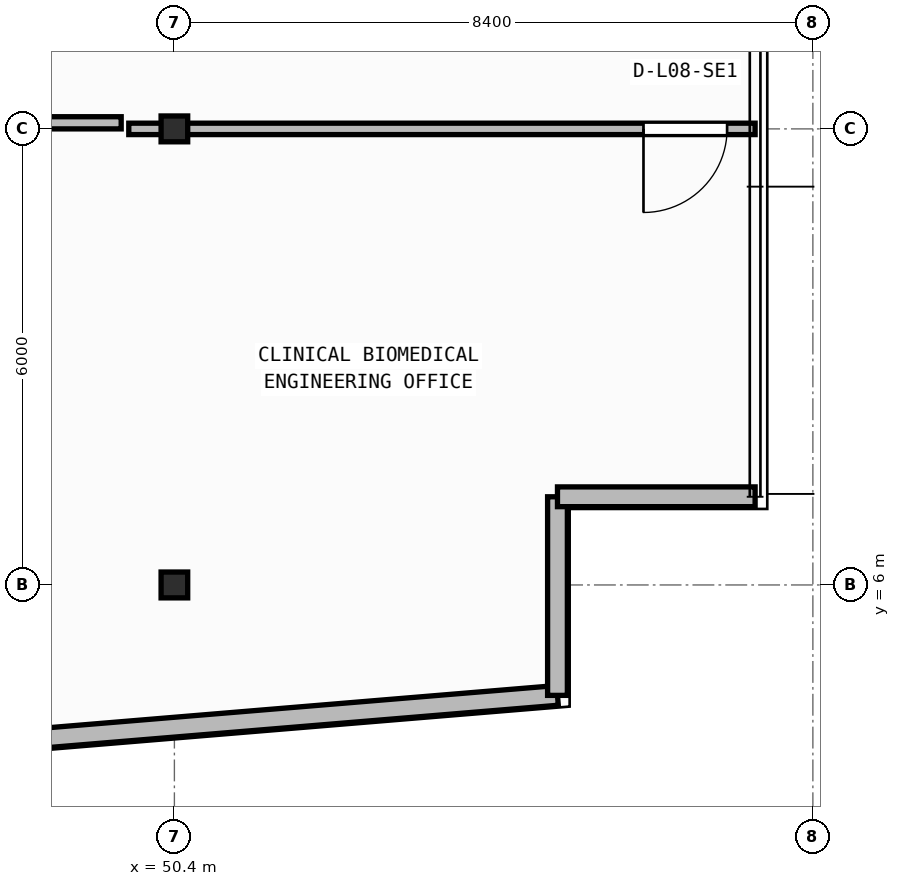
"""IFC4 building model, lengths in metres.
Left out: names, types, materials, properties, quantities, classifications, styles, units other than length and angle.
Written with IfcOpenShell. Run it as: python <this file> out.ifc"""

import sys

from ifc_helpers import new_model, si_unit, direction, frame, frame_2d, origin, origin_2d, place, context, subcontext, project, spatial, rectangle, i_section, extrude, element, fill, save


model = new_model("IFC4")
c1 = context("Model", 3, precision=1e-05, world=origin(), true_north=direction((0.0, 1.0)))
c2 = subcontext(c1, "Body", "Model", "MODEL_VIEW")
j1 = project(units=[si_unit("LENGTHUNIT", "METRE"), si_unit("PLANEANGLEUNIT", "RADIAN")], contexts=[c1])
p1 = place(None, origin())
s1 = spatial("IfcSite", under=j1, at=p1, CompositionType="ELEMENT")
p2 = place(p1, origin())
s2 = spatial("IfcBuilding", under=s1, at=p2, CompositionType="ELEMENT")
p3 = place(p2, frame((0.0, 0.0, 34.35)))
s3 = spatial("IfcBuildingStorey", under=s2, at=p3, CompositionType="ELEMENT", Elevation=34.35)
for number, where, z_axis, x_axis in (
    (1, (50.4, 6.0, 0.0), (0.0, 0.0, 1.0), (1.0, 0.0, 0.0)),
    (2, (50.4, 12.0, 0.0), (0.0, 0.0, 1.0), (1.0, 0.0, 0.0)),
):
    element("IfcColumn", number, at=place(p3, frame(where, z_axis=z_axis, x_axis=x_axis)), inside=s3, PredefinedType="COLUMN", context=c2, shape_type="SweptSolid", body=[
        extrude(i_section(OverallWidth=0.35, OverallDepth=0.34, WebThickness=0.016, FlangeThickness=0.028, at=origin_2d()), origin(), (0.0, 0.0, 1.0), 3.95),
    ])
p4 = place(p3, frame((2.76, 0.174, 0.0), z_axis=(0.0, 0.0, 1.0), x_axis=(0.996571478456, 0.082736257641, 0.0)))
e3 = element("IfcWall", 3, at=p4, inside=s3, PredefinedType="STANDARD", context=c2, shape_type="SweptSolid", body=[
    extrude(rectangle(XDim=52.861, YDim=0.26, at=frame_2d((26.431, 0.0))), origin(), (0.0, 0.0, 1.0), 3.71),
])
p5 = place(p4, frame((25.231, 0.0, 0.9)))
e4 = element("IfcOpeningElement", 4, at=p5, cuts=e3, PredefinedType="OPENING", context=c2, shape_type="SweptSolid", body=[
    extrude(rectangle(XDim=2.4, YDim=1.65, at=frame_2d((1.2, 0.825))), frame((0.0, 0.14, 0.0), z_axis=(0.0, -1.0, 0.0), x_axis=(1.0, 0.0, 0.0)), (0.0, 0.0, 1.0), 0.28),
])
p6 = place(p3, frame((55.44, 4.547, 0.0), z_axis=(0.0, 0.0, 1.0), x_axis=(0.0, 1.0, 0.0)))
e5 = element("IfcWall", 5, at=p6, inside=s3, PredefinedType="STANDARD", context=c2, shape_type="SweptSolid", body=[
    extrude(rectangle(XDim=2.613, YDim=0.26, at=frame_2d((1.306, 0.0))), origin(), (0.0, 0.0, 1.0), 3.71),
])
p7 = place(p3, frame((55.44, 7.16, 0.0), z_axis=(0.0, 0.0, 1.0), x_axis=(1.0, 0.0, 0.0)))
e6 = element("IfcWall", 6, at=p7, inside=s3, PredefinedType="STANDARD", context=c2, shape_type="SweptSolid", body=[
    extrude(rectangle(XDim=2.6, YDim=0.26, at=frame_2d((1.3, 0.0))), origin(), (0.0, 0.0, 1.0), 3.71),
])
p8 = place(p3, frame((58.04, 12.0, 0.0), z_axis=(0.0, 0.0, 1.0), x_axis=(-1.0, 0.0, 0.0)))
e7 = element("IfcWall", 7, at=p8, inside=s3, PredefinedType="PARTITIONING", context=c2, shape_type="SweptSolid", body=[
    extrude(rectangle(XDim=8.24, YDim=0.15, at=frame_2d((4.12, 0.0))), origin(), (0.0, 0.0, 1.0), 3.073),
])
p9 = place(p8, frame((0.368, 0.0, 0.0)))
e8 = element("IfcOpeningElement", 8, at=p9, cuts=e7, PredefinedType="OPENING", context=c2, shape_type="SweptSolid", body=[
    extrude(rectangle(XDim=1.1, YDim=2.1, at=frame_2d((0.55, 1.05))), frame((0.0, 0.085, 0.0), z_axis=(0.0, -1.0, 0.0), x_axis=(1.0, 0.0, 0.0)), (0.0, 0.0, 1.0), 0.17),
])
p10 = place(p3, frame((46.689, 12.08, 0.0), z_axis=(0.0, 0.0, 1.0), x_axis=(1.0, 0.0, 0.0)))
e9 = element("IfcWall", 9, at=p10, inside=s3, PredefinedType="PARTITIONING", context=c2, shape_type="SweptSolid", body=[
    extrude(rectangle(XDim=3.011, YDim=0.16, at=frame_2d((1.505, 0.0))), origin(), (0.0, 0.0, 1.0), 3.073),
])
p11 = place(p9, origin())
e10 = element("IfcDoor", 10, at=p11, inside=s3, OperationType="SINGLE_SWING_RIGHT", PredefinedType="DOOR", context=c2, shape_type="SweptSolid", body=[
    extrude(rectangle(XDim=1.1, YDim=2.1, at=frame_2d((0.55, 1.05))), frame((0.0, 0.025, 0.0), z_axis=(0.0, -1.0, 0.0), x_axis=(1.0, 0.0, 0.0)), (0.0, 0.0, 1.0), 0.05),
])
fill(e8, e10)
save(model, sys.argv[1])
